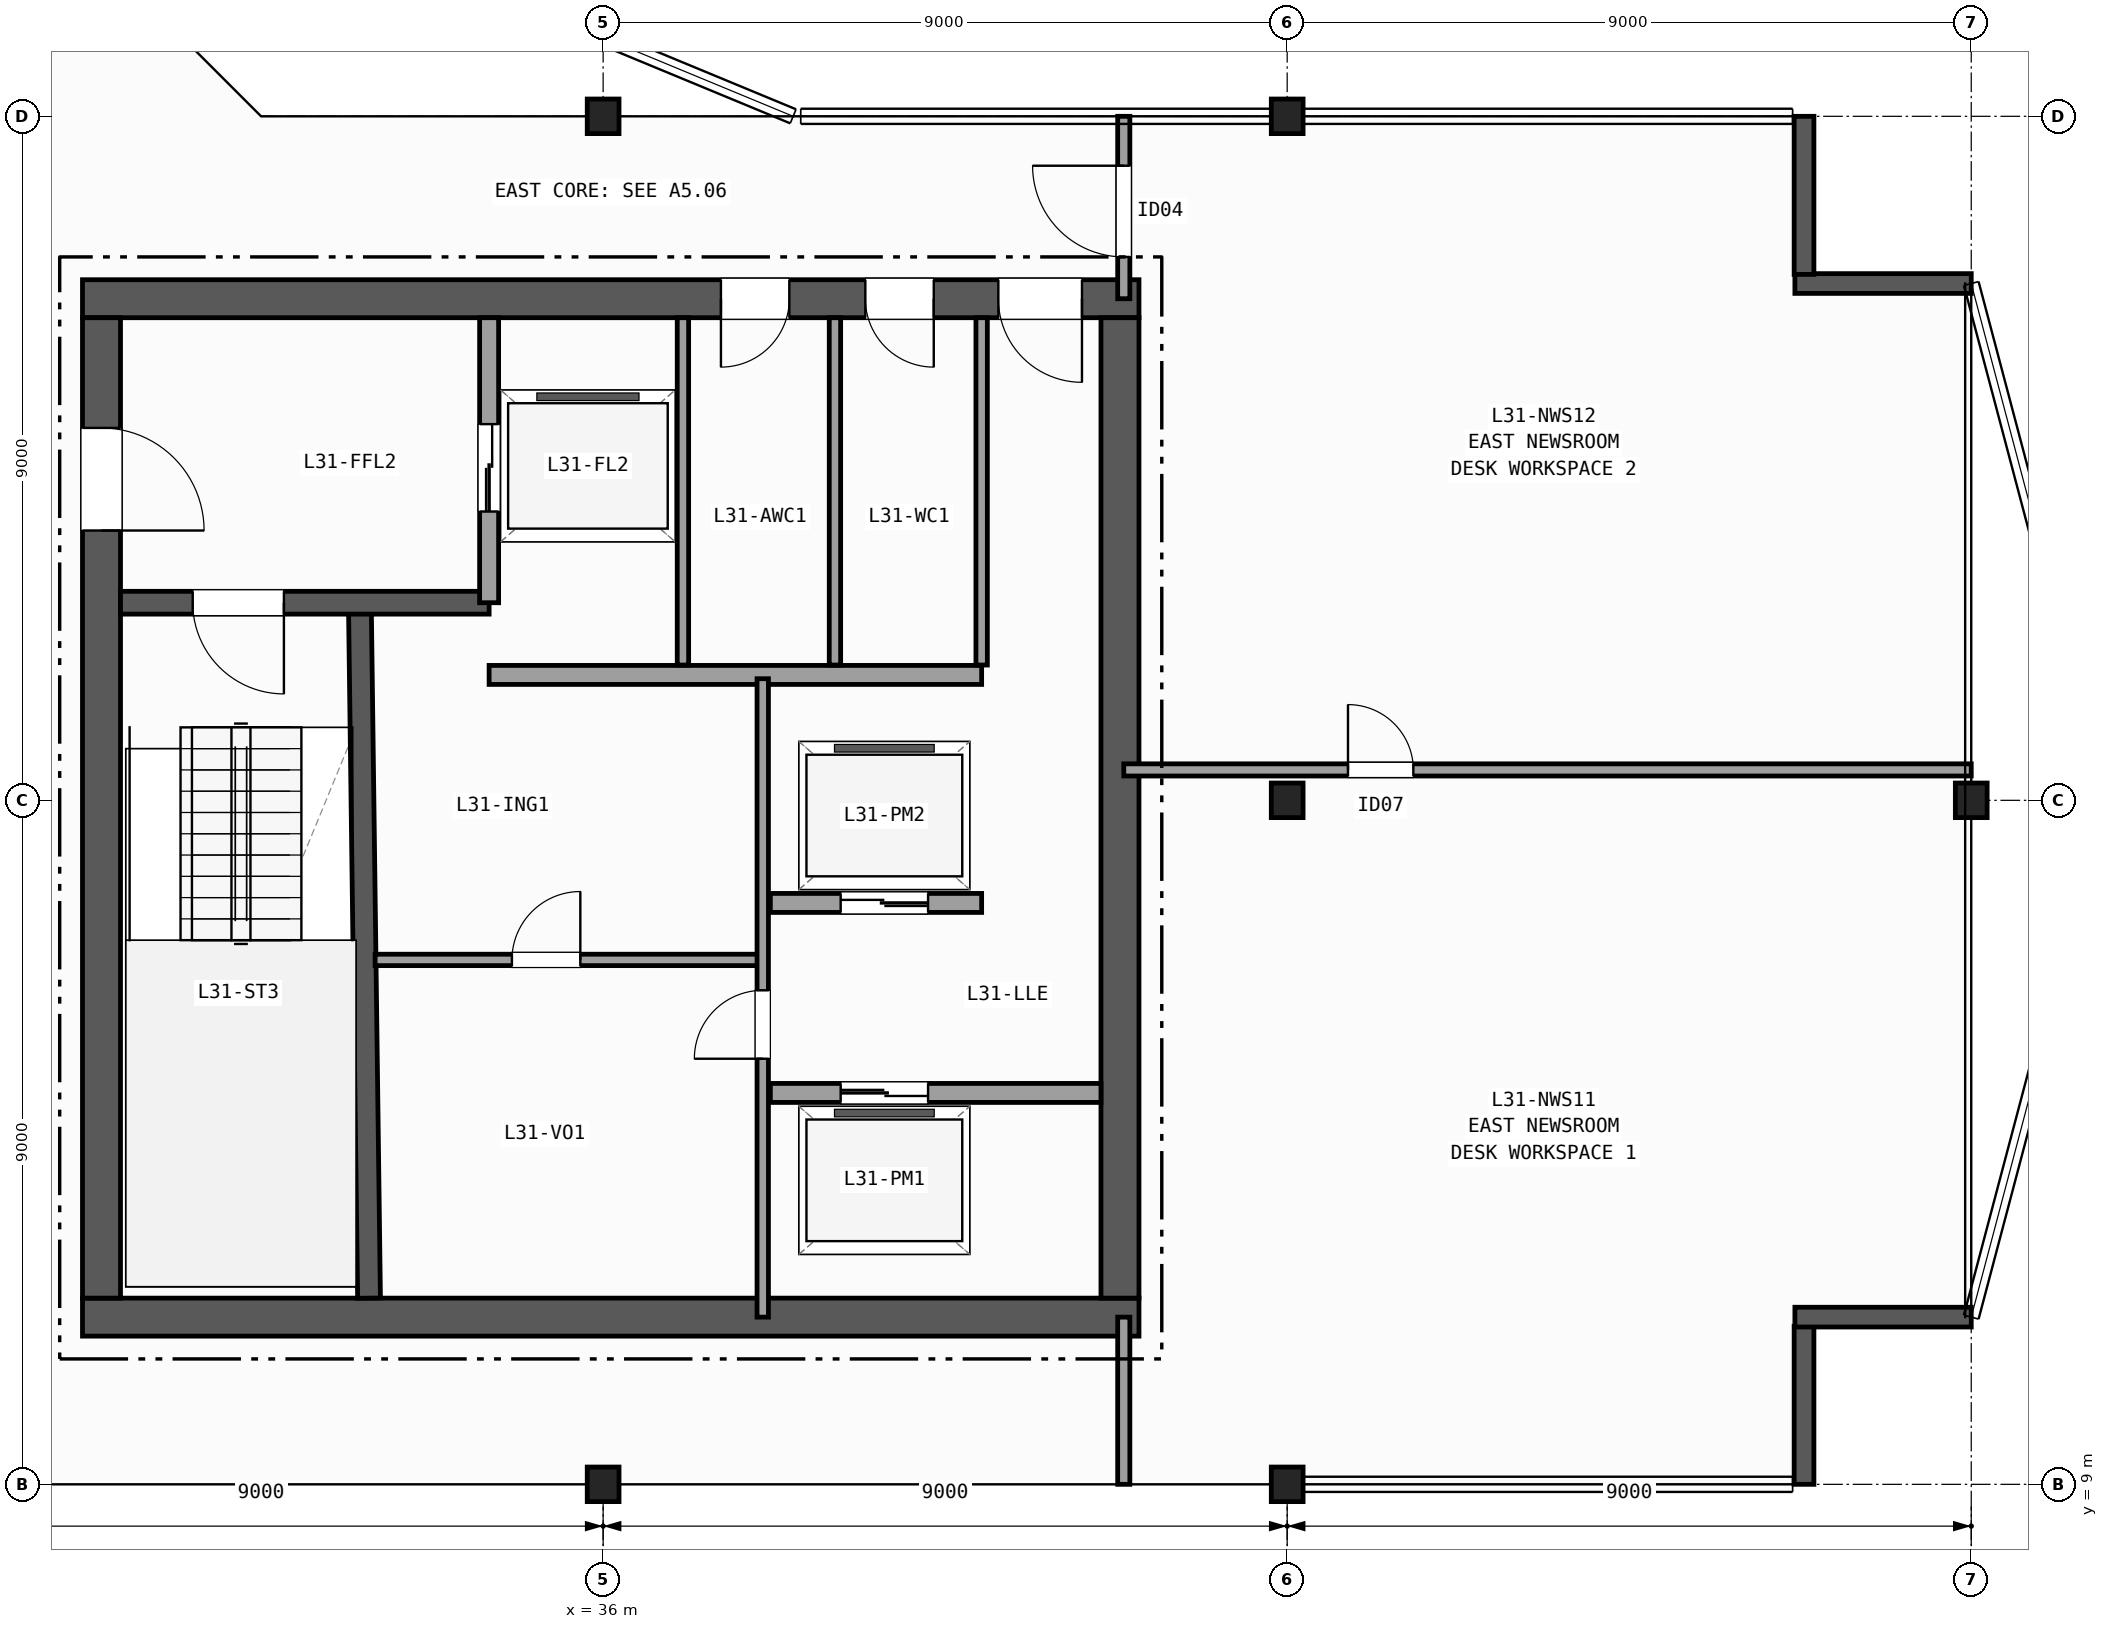
"""IFC4 building model, lengths in metres.
Left out: names, types, materials, properties, quantities, classifications, styles, units other than length and angle.
Written with IfcOpenShell. Run it as: python <this file> out.ifc"""

import sys

from ifc_helpers import new_model, si_unit, direction, frame, frame_2d, origin, origin_2d, place, context, subcontext, project, spatial, rectangle, i_section, extrude, element, fill, save


model = new_model("IFC4")
c1 = context("Model", 3, precision=1e-05, world=origin(), true_north=direction((0.0, 1.0)))
c2 = subcontext(c1, "Body", "Model", "MODEL_VIEW")
j1 = project(units=[si_unit("LENGTHUNIT", "METRE"), si_unit("PLANEANGLEUNIT", "RADIAN")], contexts=[c1])
p1 = place(None, origin())
s1 = spatial("IfcSite", under=j1, at=p1, CompositionType="ELEMENT")
p2 = place(p1, origin())
s2 = spatial("IfcBuilding", under=s1, at=p2, CompositionType="ELEMENT")
p3 = place(p2, frame((0.0, 0.0, 128.5)))
s3 = spatial("IfcBuildingStorey", under=s2, at=p3, CompositionType="ELEMENT", Elevation=128.5)
for number, where, z_axis, x_axis in (
    (1, (36.0, 9.0, 0.0), (0.0, 0.0, 1.0), (1.0, 0.0, 0.0)),
    (2, (36.0, 27.0, 0.0), (0.0, 0.0, 1.0), (1.0, 0.0, 0.0)),
    (3, (45.0, 9.0, 0.0), (0.0, 0.0, 1.0), (1.0, 0.0, 0.0)),
    (4, (45.0, 18.0, 0.0), (0.0, 0.0, 1.0), (1.0, 0.0, 0.0)),
    (5, (45.0, 27.0, 0.0), (0.0, 0.0, 1.0), (1.0, 0.0, 0.0)),
    (6, (54.0, 18.0, 0.0), (0.0, 0.0, 1.0), (1.0, 0.0, 0.0)),
):
    element("IfcColumn", number, at=place(p3, frame(where, z_axis=z_axis, x_axis=x_axis)), inside=s3, PredefinedType="COLUMN", context=c2, shape_type="SweptSolid", body=[
        extrude(i_section(OverallWidth=0.418, OverallDepth=0.455, WebThickness=0.042, FlangeThickness=0.068, FilletRadius=0.015, at=origin_2d()), origin(), (0.0, 0.0, 1.0), 3.7),
    ])
p4 = place(p3, frame((51.8, 9.0, 0.0), z_axis=(0.0, 0.0, 1.0), x_axis=(0.0, 1.0, 0.0)))
e7 = element("IfcWall", 7, at=p4, inside=s3, PredefinedType="SOLIDWALL", context=c2, shape_type="SweptSolid", body=[
    extrude(rectangle(XDim=2.08, YDim=0.26, at=frame_2d((1.04, 0.0))), origin(), (0.0, 0.0, 1.0), 3.42),
])
for number, where, z_axis, x_axis in (
    (8, (51.68, 11.2, 0.0), (0.0, 0.0, 1.0), (1.0, 0.0, 0.0)),
    (9, (54.0, 24.8, 0.0), (0.0, 0.0, 1.0), (-1.0, 0.0, 0.0)),
):
    element("IfcWall", number, at=place(p3, frame(where, z_axis=z_axis, x_axis=x_axis)), inside=s3, PredefinedType="SOLIDWALL", context=c2, shape_type="SweptSolid", body=[
        extrude(rectangle(XDim=2.32, YDim=0.26, at=frame_2d((1.16, 0.0))), origin(), (0.0, 0.0, 1.0), 3.42),
    ])
p5 = place(p3, frame((51.8, 24.92, 0.0), z_axis=(0.0, 0.0, 1.0), x_axis=(0.0, 1.0, 0.0)))
e10 = element("IfcWall", 10, at=p5, inside=s3, PredefinedType="SOLIDWALL", context=c2, shape_type="SweptSolid", body=[
    extrude(rectangle(XDim=2.08, YDim=0.26, at=frame_2d((1.04, 0.0))), origin(), (0.0, 0.0, 1.0), 3.42),
])
p6 = place(p3, frame((29.15, 11.2, 0.0), z_axis=(0.0, 0.0, 1.0), x_axis=(1.0, 0.0, 0.0)))
e11 = element("IfcWall", 11, at=p6, inside=s3, PredefinedType="SHEAR", context=c2, shape_type="SweptSolid", body=[
    extrude(rectangle(XDim=13.9, YDim=0.5, at=frame_2d((6.95, 0.0))), origin(), (0.0, 0.0, 1.0), 3.42),
])
p7 = place(p3, frame((43.05, 24.6, 0.0), z_axis=(0.0, 0.0, 1.0), x_axis=(-1.0, 0.0, 0.0)))
e12 = element("IfcWall", 12, at=p7, inside=s3, PredefinedType="SHEAR", context=c2, shape_type="SweptSolid", body=[
    extrude(rectangle(XDim=13.9, YDim=0.5, at=frame_2d((6.95, 0.0))), origin(), (0.0, 0.0, 1.0), 3.42),
])
p8 = place(p7, frame((0.75, 0.0, 0.0)))
e13 = element("IfcOpeningElement", 13, at=p8, cuts=e12, PredefinedType="OPENING", context=c2, shape_type="SweptSolid", body=[
    extrude(rectangle(XDim=1.1, YDim=2.15, at=frame_2d((0.55, 1.075))), frame((0.0, 0.26, 0.0), z_axis=(0.0, -1.0, 0.0), x_axis=(1.0, 0.0, 0.0)), (0.0, 0.0, 1.0), 0.52),
])
p9 = place(p7, frame((2.7, 0.0, 0.0)))
e14 = element("IfcOpeningElement", 14, at=p9, cuts=e12, PredefinedType="OPENING", context=c2, shape_type="SweptSolid", body=[
    extrude(rectangle(XDim=0.9, YDim=2.1, at=frame_2d((0.45, 1.05))), frame((0.0, 0.26, 0.0), z_axis=(0.0, -1.0, 0.0), x_axis=(1.0, 0.0, 0.0)), (0.0, 0.0, 1.0), 0.52),
])
p10 = place(p7, frame((4.6, 0.0, 0.0)))
e15 = element("IfcOpeningElement", 15, at=p10, cuts=e12, PredefinedType="OPENING", context=c2, shape_type="SweptSolid", body=[
    extrude(rectangle(XDim=0.9, YDim=2.1, at=frame_2d((0.45, 1.05))), frame((0.0, 0.26, 0.0), z_axis=(0.0, -1.0, 0.0), x_axis=(1.0, 0.0, 0.0)), (0.0, 0.0, 1.0), 0.52),
])
p11 = place(p3, frame((29.4, 24.35, 0.0), z_axis=(0.0, 0.0, 1.0), x_axis=(0.0, -1.0, 0.0)))
e16 = element("IfcWall", 16, at=p11, inside=s3, PredefinedType="SHEAR", context=c2, shape_type="SweptSolid", body=[
    extrude(rectangle(XDim=12.9, YDim=0.5, at=frame_2d((6.45, 0.0))), origin(), (0.0, 0.0, 1.0), 3.42),
])
p12 = place(p11, frame((1.45, 0.0, 0.0)))
e17 = element("IfcOpeningElement", 17, at=p12, cuts=e16, PredefinedType="OPENING", context=c2, shape_type="SweptSolid", body=[
    extrude(rectangle(XDim=1.35, YDim=2.15, at=frame_2d((0.675, 1.075))), frame((0.0, 0.26, 0.0), z_axis=(0.0, -1.0, 0.0), x_axis=(1.0, 0.0, 0.0)), (0.0, 0.0, 1.0), 0.52),
])
p13 = place(p3, frame((42.8, 11.45, 0.0), z_axis=(0.0, 0.0, 1.0), x_axis=(0.0, 1.0, 0.0)))
e18 = element("IfcWall", 18, at=p13, inside=s3, PredefinedType="SHEAR", context=c2, shape_type="SweptSolid", body=[
    extrude(rectangle(XDim=12.9, YDim=0.5, at=frame_2d((6.45, 0.0))), origin(), (0.0, 0.0, 1.0), 3.42),
])
p14 = place(p3, frame((32.92, 11.45, 0.0), z_axis=(0.0, 0.0, 1.0), x_axis=(-0.013171578211, 0.999913251001, 0.0)))
e19 = element("IfcWall", 19, at=p14, inside=s3, PredefinedType="SHEAR", context=c2, shape_type="SweptSolid", body=[
    extrude(rectangle(XDim=9.101, YDim=0.3, at=frame_2d((4.55, 0.0))), origin(), (0.0, 0.0, 1.0), 3.42),
])
p15 = place(p3, frame((34.5, 20.6, 0.0), z_axis=(0.0, 0.0, 1.0), x_axis=(-1.0, 0.0, 0.0)))
e20 = element("IfcWall", 20, at=p15, inside=s3, PredefinedType="SHEAR", context=c2, shape_type="SweptSolid", body=[
    extrude(rectangle(XDim=4.85, YDim=0.3, at=frame_2d((2.425, 0.0))), origin(), (0.0, 0.0, 1.0), 3.42),
])
p16 = place(p15, frame((2.7, 0.0, 0.0)))
e21 = element("IfcOpeningElement", 21, at=p16, cuts=e20, PredefinedType="OPENING", context=c2, shape_type="SweptSolid", body=[
    extrude(rectangle(XDim=1.2, YDim=2.15, at=frame_2d((0.6, 1.075))), frame((0.0, 0.16, 0.0), z_axis=(0.0, -1.0, 0.0), x_axis=(1.0, 0.0, 0.0)), (0.0, 0.0, 1.0), 0.32),
])
p17 = place(p3, frame((34.5, 20.6, 0.0), z_axis=(0.0, 0.0, 1.0), x_axis=(0.0, 1.0, 0.0)))
e22 = element("IfcWall", 22, at=p17, inside=s3, PredefinedType="PARTITIONING", context=c2, shape_type="SweptSolid", body=[
    extrude(rectangle(XDim=3.75, YDim=0.25, at=frame_2d((1.875, 0.0))), origin(), (0.0, 0.0, 1.0), 3.42),
])
p18 = place(p17, frame((1.2, 0.0, 0.0)))
e23 = element("IfcOpeningElement", 23, at=p18, cuts=e22, PredefinedType="OPENING", context=c2, shape_type="SweptSolid", body=[
    extrude(rectangle(XDim=1.15, YDim=2.15, at=frame_2d((0.575, 1.075))), frame((0.0, 0.135, 0.0), z_axis=(0.0, -1.0, 0.0), x_axis=(1.0, 0.0, 0.0)), (0.0, 0.0, 1.0), 0.27),
])
p19 = place(p3, frame((34.5, 19.65, 0.0), z_axis=(0.0, 0.0, 1.0), x_axis=(1.0, 0.0, 0.0)))
e24 = element("IfcWall", 24, at=p19, inside=s3, PredefinedType="PARTITIONING", context=c2, shape_type="SweptSolid", body=[
    extrude(rectangle(XDim=6.48, YDim=0.25, at=frame_2d((3.24, 0.0))), origin(), (0.0, 0.0, 1.0), 3.42),
])
p20 = place(p3, frame((38.2, 14.15, 0.0), z_axis=(0.0, 0.0, 1.0), x_axis=(1.0, 0.0, 0.0)))
e25 = element("IfcWall", 25, at=p20, inside=s3, PredefinedType="PARTITIONING", context=c2, shape_type="SweptSolid", body=[
    extrude(rectangle(XDim=4.35, YDim=0.25, at=frame_2d((2.175, 0.0))), origin(), (0.0, 0.0, 1.0), 3.42),
])
p21 = place(p20, frame((0.925, 0.0, 0.0)))
e26 = element("IfcOpeningElement", 26, at=p21, cuts=e25, PredefinedType="OPENING", context=c2, shape_type="SweptSolid", body=[
    extrude(rectangle(XDim=1.15, YDim=2.15, at=frame_2d((0.575, 1.075))), frame((0.0, 0.135, 0.0), z_axis=(0.0, -1.0, 0.0), x_axis=(1.0, 0.0, 0.0)), (0.0, 0.0, 1.0), 0.27),
])
p22 = place(p3, frame((40.98, 16.65, 0.0), z_axis=(0.0, 0.0, 1.0), x_axis=(-1.0, 0.0, 0.0)))
e27 = element("IfcWall", 27, at=p22, inside=s3, PredefinedType="PARTITIONING", context=c2, shape_type="SweptSolid", body=[
    extrude(rectangle(XDim=2.78, YDim=0.25, at=frame_2d((1.39, 0.0))), origin(), (0.0, 0.0, 1.0), 3.42),
])
p23 = place(p22, frame((0.705, 0.0, 0.0)))
e28 = element("IfcOpeningElement", 28, at=p23, cuts=e27, PredefinedType="OPENING", context=c2, shape_type="SweptSolid", body=[
    extrude(rectangle(XDim=1.15, YDim=2.15, at=frame_2d((0.575, 1.075))), frame((0.0, 0.135, 0.0), z_axis=(0.0, -1.0, 0.0), x_axis=(1.0, 0.0, 0.0)), (0.0, 0.0, 1.0), 0.27),
])
p24 = place(p3, frame((33.0, 15.9, 0.0), z_axis=(0.0, 0.0, 1.0), x_axis=(1.0, 0.0, 0.0)))
e29 = element("IfcWall", 29, at=p24, inside=s3, PredefinedType="PARTITIONING", context=c2, shape_type="SweptSolid", body=[
    extrude(rectangle(XDim=5.1, YDim=0.15, at=frame_2d((2.55, 0.0))), origin(), (0.0, 0.0, 1.0), 3.42),
])
p25 = place(p24, frame((1.8, 0.0, 0.0)))
e30 = element("IfcOpeningElement", 30, at=p25, cuts=e29, PredefinedType="OPENING", context=c2, shape_type="SweptSolid", body=[
    extrude(rectangle(XDim=0.9, YDim=2.1, at=frame_2d((0.45, 1.05))), frame((0.0, 0.085, 0.0), z_axis=(0.0, -1.0, 0.0), x_axis=(1.0, 0.0, 0.0)), (0.0, 0.0, 1.0), 0.17),
])
p26 = place(p3, frame((38.1, 11.2, 0.0), z_axis=(0.0, 0.0, 1.0), x_axis=(0.0, 1.0, 0.0)))
e31 = element("IfcWall", 31, at=p26, inside=s3, PredefinedType="PARTITIONING", context=c2, shape_type="SweptSolid", body=[
    extrude(rectangle(XDim=8.4, YDim=0.15, at=frame_2d((4.2, 0.0))), origin(), (0.0, 0.0, 1.0), 3.42),
])
p27 = place(p26, frame((3.4, 0.0, 0.0)))
e32 = element("IfcOpeningElement", 32, at=p27, cuts=e31, PredefinedType="OPENING", context=c2, shape_type="SweptSolid", body=[
    extrude(rectangle(XDim=0.9, YDim=2.1, at=frame_2d((0.45, 1.05))), frame((0.0, 0.085, 0.0), z_axis=(0.0, -1.0, 0.0), x_axis=(1.0, 0.0, 0.0)), (0.0, 0.0, 1.0), 0.17),
])
for number, where, z_axis, x_axis in (
    (33, (37.05, 19.78, 0.0), (0.0, 0.0, 1.0), (0.0, 1.0, 0.0)),
    (34, (39.05, 19.78, 0.0), (0.0, 0.0, 1.0), (0.0, 1.0, 0.0)),
    (35, (40.98, 19.78, 0.0), (0.0, 0.0, 1.0), (0.0, 1.0, 0.0)),
):
    element("IfcWall", number, at=place(p3, frame(where, z_axis=z_axis, x_axis=x_axis)), inside=s3, PredefinedType="PARTITIONING", context=c2, shape_type="SweptSolid", body=[
        extrude(rectangle(XDim=4.57, YDim=0.15, at=frame_2d((2.285, 0.0))), origin(), (0.0, 0.0, 1.0), 3.42),
    ])
p28 = place(p3, frame((42.85, 9.0, 0.0), z_axis=(0.0, 0.0, 1.0), x_axis=(0.0, 1.0, 0.0)))
e36 = element("IfcWall", 36, at=p28, inside=s3, PredefinedType="PARTITIONING", context=c2, shape_type="SweptSolid", body=[
    extrude(rectangle(XDim=2.2, YDim=0.16, at=frame_2d((1.1, 0.0))), origin(), (0.0, 0.0, 1.0), 2.634),
])
p29 = place(p3, frame((42.85, 24.6, 0.0), z_axis=(0.0, 0.0, 1.0), x_axis=(0.0, 1.0, 0.0)))
e37 = element("IfcWall", 37, at=p29, inside=s3, PredefinedType="PARTITIONING", context=c2, shape_type="SweptSolid", body=[
    extrude(rectangle(XDim=2.4, YDim=0.16, at=frame_2d((1.2, 0.0))), origin(), (0.0, 0.0, 1.0), 2.634),
])
p30 = place(p29, frame((0.55, 0.0, 0.0)))
e38 = element("IfcOpeningElement", 38, at=p30, cuts=e37, PredefinedType="OPENING", context=c2, shape_type="SweptSolid", body=[
    extrude(rectangle(XDim=1.2, YDim=2.15, at=frame_2d((0.6, 1.075))), frame((0.0, 0.09, 0.0), z_axis=(0.0, -1.0, 0.0), x_axis=(1.0, 0.0, 0.0)), (0.0, 0.0, 1.0), 0.18),
])
p31 = place(p3, frame((42.85, 18.4, 0.0), z_axis=(0.0, 0.0, 1.0), x_axis=(1.0, 0.0, 0.0)))
e39 = element("IfcWall", 39, at=p31, inside=s3, PredefinedType="PARTITIONING", context=c2, shape_type="SweptSolid", body=[
    extrude(rectangle(XDim=11.15, YDim=0.16, at=frame_2d((5.575, 0.0))), origin(), (0.0, 0.0, 1.0), 3.42),
])
p32 = place(p31, frame((2.95, 0.0, 0.0)))
e40 = element("IfcOpeningElement", 40, at=p32, cuts=e39, PredefinedType="OPENING", context=c2, shape_type="SweptSolid", body=[
    extrude(rectangle(XDim=0.86, YDim=2.05, at=frame_2d((0.43, 1.025))), frame((0.0, 0.09, 0.0), z_axis=(0.0, -1.0, 0.0), x_axis=(1.0, 0.0, 0.0)), (0.0, 0.0, 1.0), 0.18),
])
p33 = place(p16, origin())
e41 = element("IfcDoor", 41, at=p33, inside=s3, OperationType="SINGLE_SWING_LEFT", PredefinedType="DOOR", context=c2, shape_type="SweptSolid", body=[
    extrude(rectangle(XDim=1.2, YDim=2.15, at=frame_2d((0.6, 1.075))), frame((0.0, 0.025, 0.0), z_axis=(0.0, -1.0, 0.0), x_axis=(1.0, 0.0, 0.0)), (0.0, 0.0, 1.0), 0.05),
])
fill(e21, e41)
p34 = place(p12, origin())
e42 = element("IfcDoor", 42, at=p34, inside=s3, OperationType="SINGLE_SWING_RIGHT", PredefinedType="DOOR", context=c2, shape_type="SweptSolid", body=[
    extrude(rectangle(XDim=1.35, YDim=2.15, at=frame_2d((0.675, 1.075))), frame((0.0, 0.025, 0.0), z_axis=(0.0, -1.0, 0.0), x_axis=(1.0, 0.0, 0.0)), (0.0, 0.0, 1.0), 0.05),
])
fill(e17, e42)
p35 = place(p8, origin())
e43 = element("IfcDoor", 43, at=p35, inside=s3, OperationType="SINGLE_SWING_LEFT", PredefinedType="DOOR", context=c2, shape_type="SweptSolid", body=[
    extrude(rectangle(XDim=1.1, YDim=2.15, at=frame_2d((0.55, 1.075))), frame((0.0, 0.025, 0.0), z_axis=(0.0, -1.0, 0.0), x_axis=(1.0, 0.0, 0.0)), (0.0, 0.0, 1.0), 0.05),
])
fill(e13, e43)
p36 = place(p9, origin())
e44 = element("IfcDoor", 44, at=p36, inside=s3, OperationType="SINGLE_SWING_LEFT", PredefinedType="DOOR", context=c2, shape_type="SweptSolid", body=[
    extrude(rectangle(XDim=0.9, YDim=2.1, at=frame_2d((0.45, 1.05))), frame((0.0, 0.025, 0.0), z_axis=(0.0, -1.0, 0.0), x_axis=(1.0, 0.0, 0.0)), (0.0, 0.0, 1.0), 0.05),
])
fill(e14, e44)
p37 = place(p10, origin())
e45 = element("IfcDoor", 45, at=p37, inside=s3, OperationType="SINGLE_SWING_RIGHT", PredefinedType="DOOR", context=c2, shape_type="SweptSolid", body=[
    extrude(rectangle(XDim=0.9, YDim=2.1, at=frame_2d((0.45, 1.05))), frame((0.0, 0.025, 0.0), z_axis=(0.0, -1.0, 0.0), x_axis=(1.0, 0.0, 0.0)), (0.0, 0.0, 1.0), 0.05),
])
fill(e15, e45)
p38 = place(p18, origin())
e46 = element("IfcDoor", 46, at=p38, inside=s3, OperationType="DOUBLE_DOOR_SLIDING", PredefinedType="DOOR", context=c2, shape_type="SweptSolid", body=[
    extrude(rectangle(XDim=1.15, YDim=2.15, at=frame_2d((0.575, 1.075))), frame((0.0, 0.025, 0.0), z_axis=(0.0, -1.0, 0.0), x_axis=(1.0, 0.0, 0.0)), (0.0, 0.0, 1.0), 0.05),
])
fill(e23, e46)
p39 = place(p21, origin())
e47 = element("IfcDoor", 47, at=p39, inside=s3, OperationType="DOUBLE_DOOR_SLIDING", PredefinedType="DOOR", context=c2, shape_type="SweptSolid", body=[
    extrude(rectangle(XDim=1.15, YDim=2.15, at=frame_2d((0.575, 1.075))), frame((0.0, 0.025, 0.0), z_axis=(0.0, -1.0, 0.0), x_axis=(1.0, 0.0, 0.0)), (0.0, 0.0, 1.0), 0.05),
])
fill(e26, e47)
p40 = place(p23, origin())
e48 = element("IfcDoor", 48, at=p40, inside=s3, OperationType="DOUBLE_DOOR_SLIDING", PredefinedType="DOOR", context=c2, shape_type="SweptSolid", body=[
    extrude(rectangle(XDim=1.15, YDim=2.15, at=frame_2d((0.575, 1.075))), frame((0.0, 0.025, 0.0), z_axis=(0.0, -1.0, 0.0), x_axis=(1.0, 0.0, 0.0)), (0.0, 0.0, 1.0), 0.05),
])
fill(e28, e48)
p41 = place(p27, origin())
e49 = element("IfcDoor", 49, at=p41, inside=s3, OperationType="SINGLE_SWING_LEFT", PredefinedType="DOOR", context=c2, shape_type="SweptSolid", body=[
    extrude(rectangle(XDim=0.9, YDim=2.1, at=frame_2d((0.45, 1.05))), frame((0.0, 0.025, 0.0), z_axis=(0.0, -1.0, 0.0), x_axis=(1.0, 0.0, 0.0)), (0.0, 0.0, 1.0), 0.05),
])
fill(e32, e49)
p42 = place(p25, origin())
e50 = element("IfcDoor", 50, at=p42, inside=s3, OperationType="SINGLE_SWING_RIGHT", PredefinedType="DOOR", context=c2, shape_type="SweptSolid", body=[
    extrude(rectangle(XDim=0.9, YDim=2.1, at=frame_2d((0.45, 1.05))), frame((0.0, 0.025, 0.0), z_axis=(0.0, -1.0, 0.0), x_axis=(1.0, 0.0, 0.0)), (0.0, 0.0, 1.0), 0.05),
])
fill(e30, e50)
p43 = place(p30, origin())
e51 = element("IfcDoor", 51, at=p43, inside=s3, OperationType="SINGLE_SWING_RIGHT", PredefinedType="DOOR", context=c2, shape_type="SweptSolid", body=[
    extrude(rectangle(XDim=1.2, YDim=2.15, at=frame_2d((0.6, 1.075))), frame((0.0, 0.025, 0.0), z_axis=(0.0, -1.0, 0.0), x_axis=(1.0, 0.0, 0.0)), (0.0, 0.0, 1.0), 0.05),
])
fill(e38, e51)
p44 = place(p32, origin())
e52 = element("IfcDoor", 52, at=p44, inside=s3, OperationType="SINGLE_SWING_LEFT", PredefinedType="DOOR", context=c2, shape_type="SweptSolid", body=[
    extrude(rectangle(XDim=0.86, YDim=2.05, at=frame_2d((0.43, 1.025))), frame((0.0, 0.025, 0.0), z_axis=(0.0, -1.0, 0.0), x_axis=(1.0, 0.0, 0.0)), (0.0, 0.0, 1.0), 0.05),
])
fill(e40, e52)
save(model, sys.argv[1])
